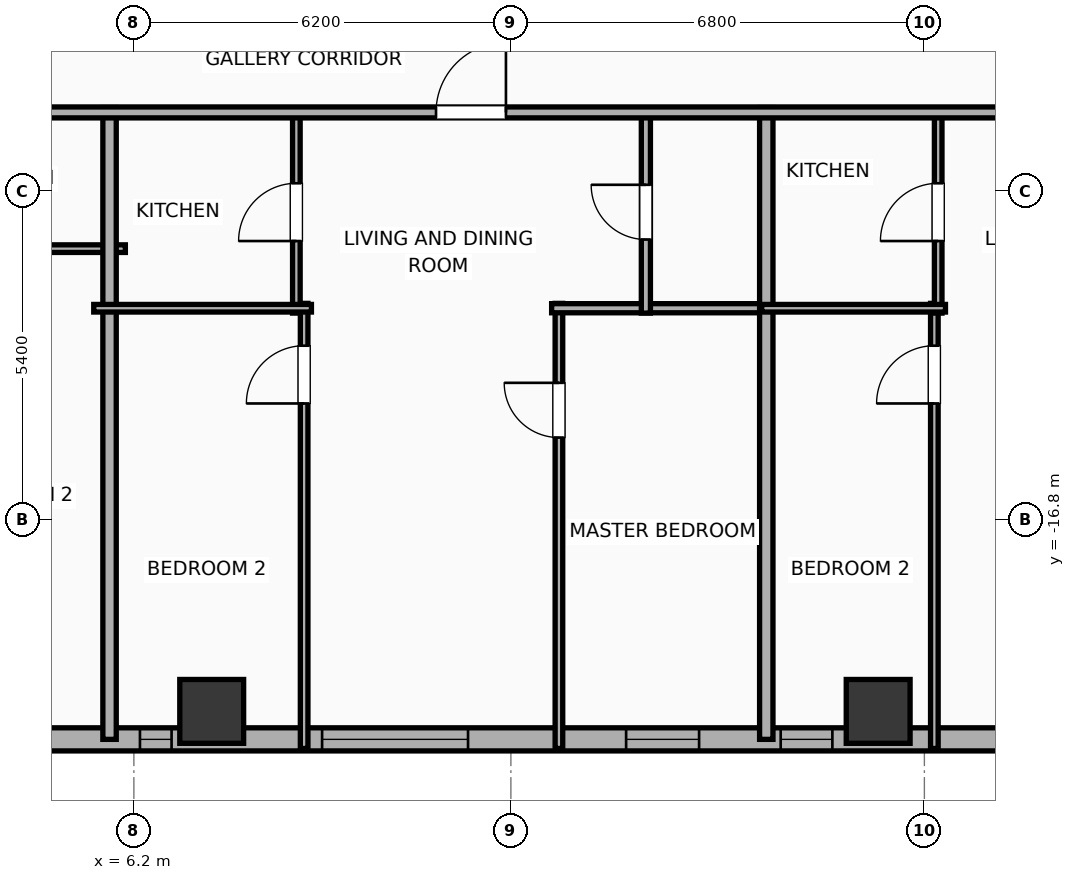
"""IFC4 building model, lengths in metres.
Left out: names, types, materials, properties, quantities, classifications, styles, units other than length and angle.
Written with IfcOpenShell. Run it as: python <this file> out.ifc"""

import sys

from ifc_helpers import new_model, si_unit, direction, frame, frame_2d, origin, origin_2d, place, context, subcontext, project, spatial, rectangle, hollow_rectangle, extrude, element, fill, save


model = new_model("IFC4")
c1 = context("Model", 3, precision=1e-05, world=origin(), true_north=direction((0.0, 1.0)))
c2 = subcontext(c1, "Body", "Model", "MODEL_VIEW")
j1 = project(units=[si_unit("LENGTHUNIT", "METRE"), si_unit("PLANEANGLEUNIT", "RADIAN")], contexts=[c1])
p1 = place(None, origin())
s1 = spatial("IfcSite", under=j1, at=p1, CompositionType="ELEMENT")
p2 = place(p1, origin())
s2 = spatial("IfcBuilding", under=s1, at=p2, CompositionType="ELEMENT")
p3 = place(p2, frame((0.0, 0.0, 97.5)))
s3 = spatial("IfcBuildingStorey", under=s2, at=p3, CompositionType="ELEMENT", Elevation=97.5)
for number, where, z_axis, x_axis in (
    (1, (7.48, -19.95, 0.0), (0.0, 0.0, 1.0), (1.0, 0.0, 0.0)),
    (2, (18.44, -19.95, 0.0), (0.0, 0.0, 1.0), (1.0, 0.0, 0.0)),
):
    element("IfcColumn", number, at=place(p3, frame(where, z_axis=z_axis, x_axis=x_axis)), inside=s3, PredefinedType="COLUMN", context=c2, shape_type="SweptSolid", body=[
        extrude(hollow_rectangle(XDim=1.05, YDim=1.05, WallThickness=0.036, at=origin_2d()), origin(), (0.0, 0.0, 1.0), 3.9),
    ])
p4 = place(p3, frame((29.381, -20.41, 0.0), z_axis=(0.0, 0.0, 1.0), x_axis=(-1.0, 0.0, 0.0)))
e3 = element("IfcWall", 3, at=p4, inside=s3, PredefinedType="ELEMENTEDWALL", context=c2, shape_type="SweptSolid", body=[
    extrude(rectangle(XDim=54.763, YDim=0.38, at=frame_2d((27.381, 0.0))), origin(), (0.0, 0.0, 1.0), 3.65),
])
p5 = place(p4, frame((6.495, 0.0, 0.75)))
e4 = element("IfcOpeningElement", 4, at=p5, cuts=e3, PredefinedType="OPENING", context=c2, shape_type="SweptSolid", body=[
    extrude(rectangle(XDim=2.4, YDim=2.1, at=frame_2d((1.2, 1.05))), frame((0.0, 0.2, 0.0), z_axis=(0.0, -1.0, 0.0), x_axis=(1.0, 0.0, 0.0)), (0.0, 0.0, 1.0), 0.4),
])
p6 = place(p4, frame((17.686, 0.0, 0.75)))
e5 = element("IfcOpeningElement", 5, at=p6, cuts=e3, PredefinedType="OPENING", context=c2, shape_type="SweptSolid", body=[
    extrude(rectangle(XDim=2.4, YDim=2.1, at=frame_2d((1.2, 1.05))), frame((0.0, 0.2, 0.0), z_axis=(0.0, -1.0, 0.0), x_axis=(1.0, 0.0, 0.0)), (0.0, 0.0, 1.0), 0.4),
])
p7 = place(p4, frame((34.677, 0.0, 0.75)))
e6 = element("IfcOpeningElement", 6, at=p7, cuts=e3, PredefinedType="OPENING", context=c2, shape_type="SweptSolid", body=[
    extrude(rectangle(XDim=2.4, YDim=2.1, at=frame_2d((1.2, 1.05))), frame((0.0, 0.2, 0.0), z_axis=(0.0, -1.0, 0.0), x_axis=(1.0, 0.0, 0.0)), (0.0, 0.0, 1.0), 0.4),
])
p8 = place(p4, frame((45.867, 0.0, 0.75)))
e7 = element("IfcOpeningElement", 7, at=p8, cuts=e3, PredefinedType="OPENING", context=c2, shape_type="SweptSolid", body=[
    extrude(rectangle(XDim=2.4, YDim=2.1, at=frame_2d((1.2, 1.05))), frame((0.0, 0.2, 0.0), z_axis=(0.0, -1.0, 0.0), x_axis=(1.0, 0.0, 0.0)), (0.0, 0.0, 1.0), 0.4),
])
p9 = place(p4, frame((52.281, 0.0, 0.75)))
e8 = element("IfcOpeningElement", 8, at=p9, cuts=e3, PredefinedType="OPENING", context=c2, shape_type="SweptSolid", body=[
    extrude(rectangle(XDim=1.2, YDim=2.05, at=frame_2d((0.6, 1.025))), frame((0.0, 0.2, 0.0), z_axis=(0.0, -1.0, 0.0), x_axis=(1.0, 0.0, 0.0)), (0.0, 0.0, 1.0), 0.4),
])
p10 = place(p4, frame((49.641, 0.0, 0.75)))
e9 = element("IfcOpeningElement", 9, at=p10, cuts=e3, PredefinedType="OPENING", context=c2, shape_type="SweptSolid", body=[
    extrude(rectangle(XDim=1.2, YDim=2.05, at=frame_2d((0.6, 1.025))), frame((0.0, 0.2, 0.0), z_axis=(0.0, -1.0, 0.0), x_axis=(1.0, 0.0, 0.0)), (0.0, 0.0, 1.0), 0.4),
])
p11 = place(p4, frame((39.543, 0.0, 0.75)))
e10 = element("IfcOpeningElement", 10, at=p11, cuts=e3, PredefinedType="OPENING", context=c2, shape_type="SweptSolid", body=[
    extrude(rectangle(XDim=1.2, YDim=2.05, at=frame_2d((0.6, 1.025))), frame((0.0, 0.2, 0.0), z_axis=(0.0, -1.0, 0.0), x_axis=(1.0, 0.0, 0.0)), (0.0, 0.0, 1.0), 0.4),
])
p12 = place(p4, frame((44.538, 0.0, 0.75)))
e11 = element("IfcOpeningElement", 11, at=p12, cuts=e3, PredefinedType="OPENING", context=c2, shape_type="SweptSolid", body=[
    extrude(rectangle(XDim=0.52, YDim=2.05, at=frame_2d((0.26, 1.025))), frame((0.0, 0.2, 0.0), z_axis=(0.0, -1.0, 0.0), x_axis=(1.0, 0.0, 0.0)), (0.0, 0.0, 1.0), 0.4),
])
p13 = place(p4, frame((28.206, 0.0, 0.75)))
e12 = element("IfcOpeningElement", 12, at=p13, cuts=e3, PredefinedType="OPENING", context=c2, shape_type="SweptSolid", body=[
    extrude(rectangle(XDim=1.2, YDim=2.05, at=frame_2d((0.6, 1.025))), frame((0.0, 0.2, 0.0), z_axis=(0.0, -1.0, 0.0), x_axis=(1.0, 0.0, 0.0)), (0.0, 0.0, 1.0), 0.4),
])
p14 = place(p4, frame((31.241, 0.0, 0.75)))
e13 = element("IfcOpeningElement", 13, at=p14, cuts=e3, PredefinedType="OPENING", context=c2, shape_type="SweptSolid", body=[
    extrude(rectangle(XDim=0.85, YDim=2.05, at=frame_2d((0.425, 1.025))), frame((0.0, 0.2, 0.0), z_axis=(0.0, -1.0, 0.0), x_axis=(1.0, 0.0, 0.0)), (0.0, 0.0, 1.0), 0.4),
])
p15 = place(p4, frame((24.561, 0.0, 0.75)))
e14 = element("IfcOpeningElement", 14, at=p15, cuts=e3, PredefinedType="OPENING", context=c2, shape_type="SweptSolid", body=[
    extrude(rectangle(XDim=1.2, YDim=2.05, at=frame_2d((0.6, 1.025))), frame((0.0, 0.2, 0.0), z_axis=(0.0, -1.0, 0.0), x_axis=(1.0, 0.0, 0.0)), (0.0, 0.0, 1.0), 0.4),
])
p16 = place(p4, frame((22.561, 0.0, 0.75)))
e15 = element("IfcOpeningElement", 15, at=p16, cuts=e3, PredefinedType="OPENING", context=c2, shape_type="SweptSolid", body=[
    extrude(rectangle(XDim=0.52, YDim=2.05, at=frame_2d((0.26, 1.025))), frame((0.0, 0.2, 0.0), z_axis=(0.0, -1.0, 0.0), x_axis=(1.0, 0.0, 0.0)), (0.0, 0.0, 1.0), 0.4),
])
p17 = place(p4, frame((13.886, 0.0, 0.75)))
e16 = element("IfcOpeningElement", 16, at=p17, cuts=e3, PredefinedType="OPENING", context=c2, shape_type="SweptSolid", body=[
    extrude(rectangle(XDim=1.2, YDim=2.05, at=frame_2d((0.6, 1.025))), frame((0.0, 0.2, 0.0), z_axis=(0.0, -1.0, 0.0), x_axis=(1.0, 0.0, 0.0)), (0.0, 0.0, 1.0), 0.4),
])
p18 = place(p4, frame((11.694, 0.0, 0.75)))
e17 = element("IfcOpeningElement", 17, at=p18, cuts=e3, PredefinedType="OPENING", context=c2, shape_type="SweptSolid", body=[
    extrude(rectangle(XDim=0.85, YDim=2.05, at=frame_2d((0.425, 1.025))), frame((0.0, 0.2, 0.0), z_axis=(0.0, -1.0, 0.0), x_axis=(1.0, 0.0, 0.0)), (0.0, 0.0, 1.0), 0.4),
])
p19 = place(p4, frame((3.286, 0.0, 0.75)))
e18 = element("IfcOpeningElement", 18, at=p19, cuts=e3, PredefinedType="OPENING", context=c2, shape_type="SweptSolid", body=[
    extrude(rectangle(XDim=1.2, YDim=2.05, at=frame_2d((0.6, 1.025))), frame((0.0, 0.2, 0.0), z_axis=(0.0, -1.0, 0.0), x_axis=(1.0, 0.0, 0.0)), (0.0, 0.0, 1.0), 0.4),
])
p20 = place(p4, frame((0.816, 0.0, 0.75)))
e19 = element("IfcOpeningElement", 19, at=p20, cuts=e3, PredefinedType="OPENING", context=c2, shape_type="SweptSolid", body=[
    extrude(rectangle(XDim=1.2, YDim=2.05, at=frame_2d((0.6, 1.025))), frame((0.0, 0.2, 0.0), z_axis=(0.0, -1.0, 0.0), x_axis=(1.0, 0.0, 0.0)), (0.0, 0.0, 1.0), 0.4),
])
p21 = place(p3, frame((2.56, -12.34, 0.0), z_axis=(0.0, 0.0, 1.0), x_axis=(1.0, 0.0, 0.0)))
e20 = element("IfcWall", 20, at=p21, inside=s3, PredefinedType="PARTITIONING", context=c2, shape_type="SweptSolid", body=[
    extrude(rectangle(XDim=3.5, YDim=0.125, at=frame_2d((1.75, 0.0))), origin(), (0.0, 0.0, 1.0), 3.65),
])
p22 = place(p3, frame((5.8, -20.41, 0.0), z_axis=(0.0, 0.0, 1.0), x_axis=(0.0, 1.0, 0.0)))
e21 = element("IfcWall", 21, at=p22, inside=s3, PredefinedType="PARTITIONING", context=c2, shape_type="SweptSolid", body=[
    extrude(rectangle(XDim=10.39, YDim=0.22, at=frame_2d((5.195, 0.0))), origin(), (0.0, 0.0, 1.0), 3.04),
])
p23 = place(p3, frame((9.0, -20.56, 0.0), z_axis=(0.0, 0.0, 1.0), x_axis=(0.0, 1.0, 0.0)))
e22 = element("IfcWall", 22, at=p23, inside=s3, PredefinedType="PARTITIONING", context=c2, shape_type="SweptSolid", body=[
    extrude(rectangle(XDim=7.32, YDim=0.125, at=frame_2d((3.66, 0.0))), origin(), (0.0, 0.0, 1.0), 3.65),
])
p24 = place(p23, frame((5.674, 0.0, 0.0)))
e23 = element("IfcOpeningElement", 23, at=p24, cuts=e22, PredefinedType="OPENING", context=c2, shape_type="SweptSolid", body=[
    extrude(rectangle(XDim=0.95, YDim=2.05, at=frame_2d((0.475, 1.025))), frame((0.0, 0.073, 0.0), z_axis=(0.0, -1.0, 0.0), x_axis=(1.0, 0.0, 0.0)), (0.0, 0.0, 1.0), 0.145),
])
p25 = place(p3, frame((13.19, -20.56, 0.0), z_axis=(0.0, 0.0, 1.0), x_axis=(0.0, 1.0, 0.0)))
e24 = element("IfcWall", 24, at=p25, inside=s3, PredefinedType="PARTITIONING", context=c2, shape_type="SweptSolid", body=[
    extrude(rectangle(XDim=7.32, YDim=0.125, at=frame_2d((3.66, 0.0))), origin(), (0.0, 0.0, 1.0), 3.65),
])
p26 = place(p25, frame((5.113, 0.0, 0.0)))
e25 = element("IfcOpeningElement", 25, at=p26, cuts=e24, PredefinedType="OPENING", context=c2, shape_type="SweptSolid", body=[
    extrude(rectangle(XDim=0.9, YDim=2.05, at=frame_2d((0.45, 1.025))), frame((0.0, 0.073, 0.0), z_axis=(0.0, -1.0, 0.0), x_axis=(1.0, 0.0, 0.0)), (0.0, 0.0, 1.0), 0.145),
])
p27 = place(p3, frame((13.07, -13.32, 0.0), z_axis=(0.0, 0.0, 1.0), x_axis=(1.0, 0.0, 0.0)))
e26 = element("IfcWall", 26, at=p27, inside=s3, PredefinedType="PLUMBINGWALL", context=c2, shape_type="SweptSolid", body=[
    extrude(rectangle(XDim=3.605, YDim=0.15, at=frame_2d((1.802, 0.0))), origin(), (0.0, 0.0, 1.0), 3.65),
])
p28 = place(p3, frame((8.872, -13.4, 0.0), z_axis=(0.0, 0.0, 1.0), x_axis=(0.0, 1.0, 0.0)))
e27 = element("IfcWall", 27, at=p28, inside=s3, PredefinedType="PARTITIONING", context=c2, shape_type="SweptSolid", body=[
    extrude(rectangle(XDim=3.32, YDim=0.125, at=frame_2d((1.66, 0.0))), origin(), (0.0, 0.0, 1.0), 3.65),
])
p29 = place(p28, frame((1.185, 0.0, 0.0)))
e28 = element("IfcOpeningElement", 28, at=p29, cuts=e27, PredefinedType="OPENING", context=c2, shape_type="SweptSolid", body=[
    extrude(rectangle(XDim=0.95, YDim=2.05, at=frame_2d((0.475, 1.025))), frame((0.0, 0.073, 0.0), z_axis=(0.0, -1.0, 0.0), x_axis=(1.0, 0.0, 0.0)), (0.0, 0.0, 1.0), 0.145),
])
p30 = place(p3, frame((5.54, -13.32, 0.0), z_axis=(0.0, 0.0, 1.0), x_axis=(1.0, 0.0, 0.0)))
e29 = element("IfcWall", 29, at=p30, inside=s3, PredefinedType="PARTITIONING", context=c2, shape_type="SweptSolid", body=[
    extrude(rectangle(XDim=3.58, YDim=0.125, at=frame_2d((1.79, 0.0))), origin(), (0.0, 0.0, 1.0), 3.65),
])
p31 = place(p3, frame((14.62, -13.4, 0.0), z_axis=(0.0, 0.0, 1.0), x_axis=(0.0, 1.0, 0.0)))
e30 = element("IfcWall", 30, at=p31, inside=s3, PredefinedType="PLUMBINGWALL", context=c2, shape_type="SweptSolid", body=[
    extrude(rectangle(XDim=3.32, YDim=0.15, at=frame_2d((1.66, 0.0))), origin(), (0.0, 0.0, 1.0), 3.65),
])
p32 = place(p31, frame((1.21, 0.0, 0.0)))
e31 = element("IfcOpeningElement", 31, at=p32, cuts=e30, PredefinedType="OPENING", context=c2, shape_type="SweptSolid", body=[
    extrude(rectangle(XDim=0.9, YDim=2.05, at=frame_2d((0.45, 1.025))), frame((0.0, 0.085, 0.0), z_axis=(0.0, -1.0, 0.0), x_axis=(1.0, 0.0, 0.0)), (0.0, 0.0, 1.0), 0.17),
])
p33 = place(p3, frame((16.6, -20.41, 0.0), z_axis=(0.0, 0.0, 1.0), x_axis=(0.0, 1.0, 0.0)))
e32 = element("IfcWall", 32, at=p33, inside=s3, PredefinedType="PARTITIONING", context=c2, shape_type="SweptSolid", body=[
    extrude(rectangle(XDim=10.39, YDim=0.22, at=frame_2d((5.195, 0.0))), origin(), (0.0, 0.0, 1.0), 3.65),
])
p34 = place(p3, frame((19.364, -20.56, 0.0), z_axis=(0.0, 0.0, 1.0), x_axis=(0.0, 1.0, 0.0)))
e33 = element("IfcWall", 33, at=p34, inside=s3, PredefinedType="PARTITIONING", context=c2, shape_type="SweptSolid", body=[
    extrude(rectangle(XDim=7.32, YDim=0.125, at=frame_2d((3.66, 0.0))), origin(), (0.0, 0.0, 1.0), 3.65),
])
p35 = place(p34, frame((5.674, 0.0, 0.0)))
e34 = element("IfcOpeningElement", 34, at=p35, cuts=e33, PredefinedType="OPENING", context=c2, shape_type="SweptSolid", body=[
    extrude(rectangle(XDim=0.95, YDim=2.05, at=frame_2d((0.475, 1.025))), frame((0.0, 0.073, 0.0), z_axis=(0.0, -1.0, 0.0), x_axis=(1.0, 0.0, 0.0)), (0.0, 0.0, 1.0), 0.145),
])
p36 = place(p3, frame((19.427, -13.4, 0.0), z_axis=(0.0, 0.0, 1.0), x_axis=(0.0, 1.0, 0.0)))
e35 = element("IfcWall", 35, at=p36, inside=s3, PredefinedType="PARTITIONING", context=c2, shape_type="SweptSolid", body=[
    extrude(rectangle(XDim=3.32, YDim=0.125, at=frame_2d((1.66, 0.0))), origin(), (0.0, 0.0, 1.0), 3.65),
])
p37 = place(p36, frame((1.185, 0.0, 0.0)))
e36 = element("IfcOpeningElement", 36, at=p37, cuts=e35, PredefinedType="OPENING", context=c2, shape_type="SweptSolid", body=[
    extrude(rectangle(XDim=0.95, YDim=2.05, at=frame_2d((0.475, 1.025))), frame((0.0, 0.073, 0.0), z_axis=(0.0, -1.0, 0.0), x_axis=(1.0, 0.0, 0.0)), (0.0, 0.0, 1.0), 0.145),
])
p38 = place(p3, frame((16.525, -13.32, 0.0), z_axis=(0.0, 0.0, 1.0), x_axis=(1.0, 0.0, 0.0)))
e37 = element("IfcWall", 37, at=p38, inside=s3, PredefinedType="PARTITIONING", context=c2, shape_type="SweptSolid", body=[
    extrude(rectangle(XDim=3.022, YDim=0.125, at=frame_2d((1.511, 0.0))), origin(), (0.0, 0.0, 1.0), 3.65),
])
p39 = place(p3, frame((-29.21, -10.1, 0.0), z_axis=(0.0, 0.0, 1.0), x_axis=(1.0, 0.0, 0.0)))
e38 = element("IfcWall", 38, at=p39, inside=s3, PredefinedType="PARTITIONING", context=c2, shape_type="SweptSolid", body=[
    extrude(rectangle(XDim=62.42, YDim=0.18, at=frame_2d((31.21, 0.0))), origin(), (0.0, 0.0, 1.0), 3.65),
])
p40 = place(p39, frame((3.033, 0.0, 0.0)))
e39 = element("IfcOpeningElement", 39, at=p40, cuts=e38, PredefinedType="OPENING", context=c2, shape_type="SweptSolid", body=[
    extrude(rectangle(XDim=0.9, YDim=2.05, at=frame_2d((0.45, 1.025))), frame((0.0, 0.1, 0.0), z_axis=(0.0, -1.0, 0.0), x_axis=(1.0, 0.0, 0.0)), (0.0, 0.0, 1.0), 0.2),
])
p41 = place(p39, frame((9.768, 0.0, 0.0)))
e40 = element("IfcOpeningElement", 40, at=p41, cuts=e38, PredefinedType="OPENING", context=c2, shape_type="SweptSolid", body=[
    extrude(rectangle(XDim=0.9, YDim=2.05, at=frame_2d((0.45, 1.025))), frame((0.0, 0.1, 0.0), z_axis=(0.0, -1.0, 0.0), x_axis=(1.0, 0.0, 0.0)), (0.0, 0.0, 1.0), 0.2),
])
p42 = place(p39, frame((18.65, 0.0, 0.0)))
e41 = element("IfcOpeningElement", 41, at=p42, cuts=e38, PredefinedType="OPENING", context=c2, shape_type="SweptSolid", body=[
    extrude(rectangle(XDim=1.15, YDim=2.05, at=frame_2d((0.575, 1.025))), frame((0.0, 0.1, 0.0), z_axis=(0.0, -1.0, 0.0), x_axis=(1.0, 0.0, 0.0)), (0.0, 0.0, 1.0), 0.2),
])
p43 = place(p39, frame((29.212, 0.0, 0.0)))
e42 = element("IfcOpeningElement", 42, at=p43, cuts=e38, PredefinedType="OPENING", context=c2, shape_type="SweptSolid", body=[
    extrude(rectangle(XDim=1.15, YDim=2.05, at=frame_2d((0.575, 1.025))), frame((0.0, 0.1, 0.0), z_axis=(0.0, -1.0, 0.0), x_axis=(1.0, 0.0, 0.0)), (0.0, 0.0, 1.0), 0.2),
])
p44 = place(p39, frame((40.379, 0.0, 0.0)))
e43 = element("IfcOpeningElement", 43, at=p44, cuts=e38, PredefinedType="OPENING", context=c2, shape_type="SweptSolid", body=[
    extrude(rectangle(XDim=1.15, YDim=2.05, at=frame_2d((0.575, 1.025))), frame((0.0, 0.1, 0.0), z_axis=(0.0, -1.0, 0.0), x_axis=(1.0, 0.0, 0.0)), (0.0, 0.0, 1.0), 0.2),
])
p45 = place(p39, frame((50.959, 0.0, 0.0)))
e44 = element("IfcOpeningElement", 44, at=p45, cuts=e38, PredefinedType="OPENING", context=c2, shape_type="SweptSolid", body=[
    extrude(rectangle(XDim=1.15, YDim=2.05, at=frame_2d((0.575, 1.025))), frame((0.0, 0.1, 0.0), z_axis=(0.0, -1.0, 0.0), x_axis=(1.0, 0.0, 0.0)), (0.0, 0.0, 1.0), 0.2),
])
p46 = place(p39, frame((59.117, 0.0, 0.0)))
e45 = element("IfcOpeningElement", 45, at=p46, cuts=e38, PredefinedType="OPENING", context=c2, shape_type="SweptSolid", body=[
    extrude(rectangle(XDim=0.9, YDim=2.05, at=frame_2d((0.45, 1.025))), frame((0.0, 0.1, 0.0), z_axis=(0.0, -1.0, 0.0), x_axis=(1.0, 0.0, 0.0)), (0.0, 0.0, 1.0), 0.2),
])
p47 = place(p6, origin())
e46 = element("IfcWindow", 46, at=p47, inside=s3, PartitioningType="SINGLE_PANEL", PredefinedType="WINDOW", context=c2, shape_type="SweptSolid", body=[
    extrude(rectangle(XDim=2.4, YDim=2.1, at=frame_2d((1.2, 1.05))), frame((0.0, 0.03, 0.0), z_axis=(0.0, -1.0, 0.0), x_axis=(1.0, 0.0, 0.0)), (0.0, 0.0, 1.0), 0.06),
])
fill(e5, e46)
p48 = place(p16, origin())
e47 = element("IfcWindow", 47, at=p48, inside=s3, PartitioningType="SINGLE_PANEL", PredefinedType="WINDOW", context=c2, shape_type="SweptSolid", body=[
    extrude(rectangle(XDim=0.52, YDim=2.05, at=frame_2d((0.26, 1.025))), frame((0.0, 0.03, 0.0), z_axis=(0.0, -1.0, 0.0), x_axis=(1.0, 0.0, 0.0)), (0.0, 0.0, 1.0), 0.06),
])
fill(e15, e47)
p49 = place(p17, origin())
e48 = element("IfcWindow", 48, at=p49, inside=s3, PartitioningType="SINGLE_PANEL", PredefinedType="WINDOW", context=c2, shape_type="SweptSolid", body=[
    extrude(rectangle(XDim=1.2, YDim=2.05, at=frame_2d((0.6, 1.025))), frame((0.0, 0.03, 0.0), z_axis=(0.0, -1.0, 0.0), x_axis=(1.0, 0.0, 0.0)), (0.0, 0.0, 1.0), 0.06),
])
fill(e16, e48)
p50 = place(p18, origin())
e49 = element("IfcWindow", 49, at=p50, inside=s3, PartitioningType="SINGLE_PANEL", PredefinedType="WINDOW", context=c2, shape_type="SweptSolid", body=[
    extrude(rectangle(XDim=0.85, YDim=2.05, at=frame_2d((0.425, 1.025))), frame((0.0, 0.03, 0.0), z_axis=(0.0, -1.0, 0.0), x_axis=(1.0, 0.0, 0.0)), (0.0, 0.0, 1.0), 0.06),
])
fill(e17, e49)
p51 = place(p24, origin())
e50 = element("IfcDoor", 50, at=p51, inside=s3, OperationType="SINGLE_SWING_LEFT", PredefinedType="DOOR", context=c2, shape_type="SweptSolid", body=[
    extrude(rectangle(XDim=0.95, YDim=2.05, at=frame_2d((0.475, 1.025))), frame((0.0, 0.025, 0.0), z_axis=(0.0, -1.0, 0.0), x_axis=(1.0, 0.0, 0.0)), (0.0, 0.0, 1.0), 0.05),
])
fill(e23, e50)
p52 = place(p26, origin())
e51 = element("IfcDoor", 51, at=p52, inside=s3, OperationType="SINGLE_SWING_RIGHT", PredefinedType="DOOR", context=c2, shape_type="SweptSolid", body=[
    extrude(rectangle(XDim=0.9, YDim=2.05, at=frame_2d((0.45, 1.025))), frame((0.0, 0.025, 0.0), z_axis=(0.0, -1.0, 0.0), x_axis=(1.0, 0.0, 0.0)), (0.0, 0.0, 1.0), 0.05),
])
fill(e25, e51)
p53 = place(p29, origin())
e52 = element("IfcDoor", 52, at=p53, inside=s3, OperationType="SINGLE_SWING_LEFT", PredefinedType="DOOR", context=c2, shape_type="SweptSolid", body=[
    extrude(rectangle(XDim=0.95, YDim=2.05, at=frame_2d((0.475, 1.025))), frame((0.0, 0.025, 0.0), z_axis=(0.0, -1.0, 0.0), x_axis=(1.0, 0.0, 0.0)), (0.0, 0.0, 1.0), 0.05),
])
fill(e28, e52)
p54 = place(p32, origin())
e53 = element("IfcDoor", 53, at=p54, inside=s3, OperationType="SINGLE_SWING_RIGHT", PredefinedType="DOOR", context=c2, shape_type="SweptSolid", body=[
    extrude(rectangle(XDim=0.9, YDim=2.05, at=frame_2d((0.45, 1.025))), frame((0.0, 0.025, 0.0), z_axis=(0.0, -1.0, 0.0), x_axis=(1.0, 0.0, 0.0)), (0.0, 0.0, 1.0), 0.05),
])
fill(e31, e53)
p55 = place(p35, origin())
e54 = element("IfcDoor", 54, at=p55, inside=s3, OperationType="SINGLE_SWING_LEFT", PredefinedType="DOOR", context=c2, shape_type="SweptSolid", body=[
    extrude(rectangle(XDim=0.95, YDim=2.05, at=frame_2d((0.475, 1.025))), frame((0.0, 0.025, 0.0), z_axis=(0.0, -1.0, 0.0), x_axis=(1.0, 0.0, 0.0)), (0.0, 0.0, 1.0), 0.05),
])
fill(e34, e54)
p56 = place(p37, origin())
e55 = element("IfcDoor", 55, at=p56, inside=s3, OperationType="SINGLE_SWING_LEFT", PredefinedType="DOOR", context=c2, shape_type="SweptSolid", body=[
    extrude(rectangle(XDim=0.95, YDim=2.05, at=frame_2d((0.475, 1.025))), frame((0.0, 0.025, 0.0), z_axis=(0.0, -1.0, 0.0), x_axis=(1.0, 0.0, 0.0)), (0.0, 0.0, 1.0), 0.05),
])
fill(e36, e55)
p57 = place(p44, origin())
e56 = element("IfcDoor", 56, at=p57, inside=s3, OperationType="SINGLE_SWING_RIGHT", PredefinedType="DOOR", context=c2, shape_type="SweptSolid", body=[
    extrude(rectangle(XDim=1.15, YDim=2.05, at=frame_2d((0.575, 1.025))), frame((0.0, 0.025, 0.0), z_axis=(0.0, -1.0, 0.0), x_axis=(1.0, 0.0, 0.0)), (0.0, 0.0, 1.0), 0.05),
])
fill(e43, e56)
save(model, sys.argv[1])
